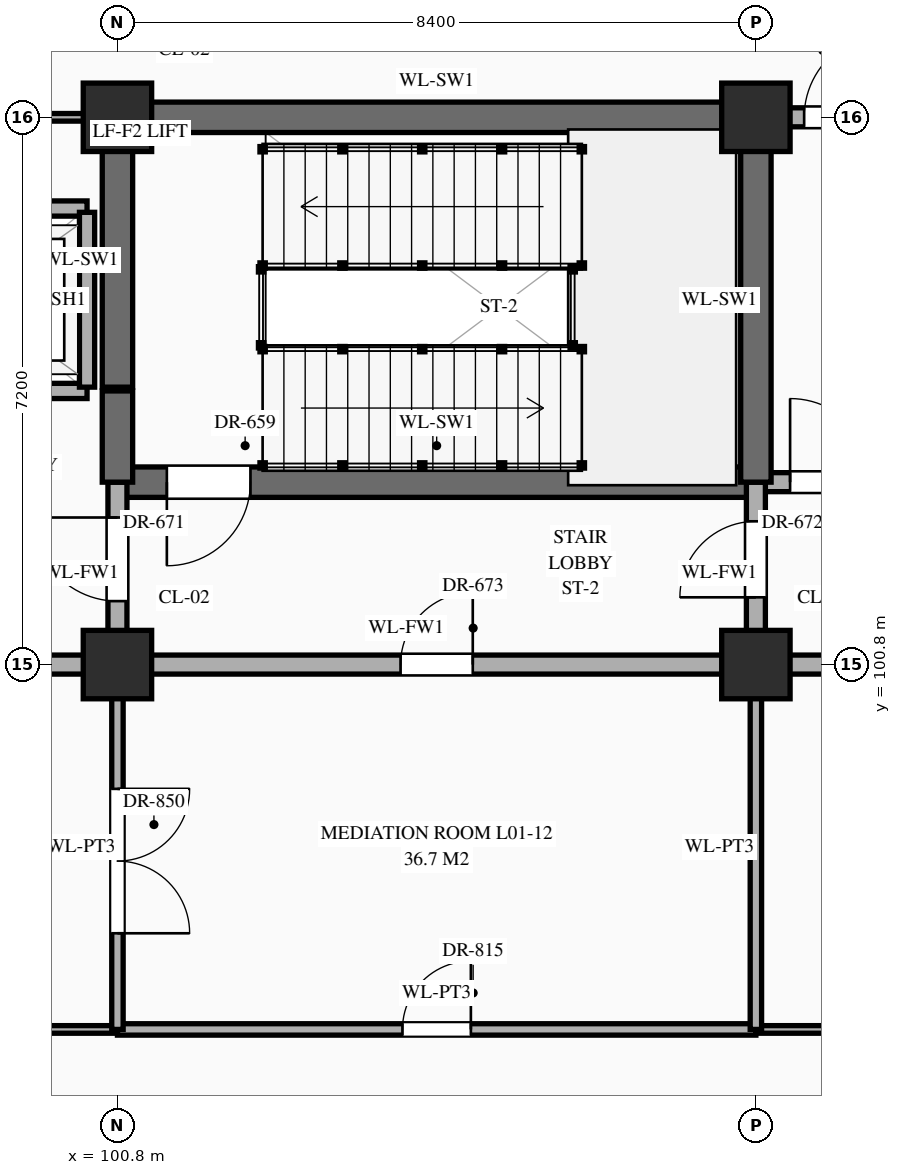
"""IFC4 building model, lengths in metres.
Left out: names, types, materials, properties, quantities, classifications, styles, units other than length and angle.
Written with IfcOpenShell. Run it as: python <this file> out.ifc"""

import sys

from ifc_helpers import new_model, si_unit, direction, frame, frame_2d, origin, origin_2d, place, context, subcontext, project, spatial, rectangle, extrude, element, fill, save


model = new_model("IFC4")
c1 = context("Model", 3, precision=1e-05, world=origin(), true_north=direction((0.0, 1.0)))
c2 = subcontext(c1, "Body", "Model", "MODEL_VIEW")
j1 = project(units=[si_unit("LENGTHUNIT", "METRE"), si_unit("PLANEANGLEUNIT", "RADIAN")], contexts=[c1])
p1 = place(None, origin())
s1 = spatial("IfcSite", under=j1, at=p1, CompositionType="ELEMENT")
p2 = place(p1, origin())
s2 = spatial("IfcBuilding", under=s1, at=p2, CompositionType="ELEMENT")
p3 = place(p2, origin())
s3 = spatial("IfcBuildingStorey", under=s2, at=p3, CompositionType="ELEMENT", Elevation=0.0)
for number, where, z_axis, x_axis in (
    (1, (100.8, 100.8, 0.0), (0.0, 0.0, 1.0), (1.0, 0.0, 0.0)),
    (2, (100.8, 108.0, 0.0), (0.0, 0.0, 1.0), (1.0, 0.0, 0.0)),
    (3, (109.2, 100.8, 0.0), (0.0, 0.0, 1.0), (1.0, 0.0, 0.0)),
    (4, (109.2, 108.0, 0.0), (0.0, 0.0, 1.0), (1.0, 0.0, 0.0)),
):
    element("IfcColumn", number, at=place(p3, frame(where, z_axis=z_axis, x_axis=x_axis)), inside=s3, PredefinedType="COLUMN", context=c2, shape_type="SweptSolid", body=[
        extrude(rectangle(XDim=0.9, YDim=0.9, at=origin_2d()), origin(), (0.0, 0.0, 1.0), 5.4),
    ])
p4 = place(p3, frame((67.2, 96.0, 0.0), z_axis=(0.0, 0.0, 1.0), x_axis=(1.0, 0.0, 0.0)))
e5 = element("IfcWall", 5, at=p4, inside=s3, PredefinedType="STANDARD", context=c2, shape_type="SweptSolid", body=[
    extrude(rectangle(XDim=33.6, YDim=0.1, at=frame_2d((16.8, 0.0))), origin(), (0.0, 0.0, 1.0), 5.12),
])
p5 = place(p4, frame((7.5, 0.0, 0.0)))
e6 = element("IfcOpeningElement", 6, at=p5, cuts=e5, PredefinedType="OPENING", context=c2, shape_type="SweptSolid", body=[
    extrude(rectangle(XDim=1.8, YDim=2.5, at=frame_2d((0.9, 1.25))), frame((0.0, 0.062, 0.0), z_axis=(0.0, -1.0, 0.0), x_axis=(1.0, 0.0, 0.0)), (0.0, 0.0, 1.0), 0.124),
])
p6 = place(p4, frame((24.25, 0.0, 0.0)))
e7 = element("IfcOpeningElement", 7, at=p6, cuts=e5, PredefinedType="OPENING", context=c2, shape_type="SweptSolid", body=[
    extrude(rectangle(XDim=1.9, YDim=2.5, at=frame_2d((0.95, 1.25))), frame((0.0, 0.062, 0.0), z_axis=(0.0, -1.0, 0.0), x_axis=(1.0, 0.0, 0.0)), (0.0, 0.0, 1.0), 0.124),
])
p7 = place(p3, frame((100.8, 96.0, 0.0), z_axis=(0.0, 0.0, 1.0), x_axis=(1.0, 0.0, 0.0)))
e8 = element("IfcWall", 8, at=p7, inside=s3, PredefinedType="STANDARD", context=c2, shape_type="SweptSolid", body=[
    extrude(rectangle(XDim=8.4, YDim=0.15, at=frame_2d((4.2, 0.0))), origin(), (0.0, 0.0, 1.0), 5.12),
])
p8 = place(p7, frame((3.75, 0.0, 0.0)))
e9 = element("IfcOpeningElement", 9, at=p8, cuts=e8, PredefinedType="OPENING", context=c2, shape_type="SweptSolid", body=[
    extrude(rectangle(XDim=0.9, YDim=2.15, at=frame_2d((0.45, 1.075))), frame((0.0, 0.087, 0.0), z_axis=(0.0, -1.0, 0.0), x_axis=(1.0, 0.0, 0.0)), (0.0, 0.0, 1.0), 0.174),
])
p9 = place(p3, frame((109.2, 96.0, 0.0), z_axis=(0.0, 0.0, 1.0), x_axis=(1.0, 0.0, 0.0)))
e10 = element("IfcWall", 10, at=p9, inside=s3, PredefinedType="STANDARD", context=c2, shape_type="SweptSolid", body=[
    extrude(rectangle(XDim=5.8, YDim=0.1, at=frame_2d((2.9, 0.0))), origin(), (0.0, 0.0, 1.0), 5.12),
])
p10 = place(p9, frame((1.27, 0.0, 0.0)))
e11 = element("IfcOpeningElement", 11, at=p10, cuts=e10, PredefinedType="OPENING", context=c2, shape_type="SweptSolid", body=[
    extrude(rectangle(XDim=0.86, YDim=2.1, at=frame_2d((0.43, 1.05))), frame((0.0, 0.062, 0.0), z_axis=(0.0, -1.0, 0.0), x_axis=(1.0, 0.0, 0.0)), (0.0, 0.0, 1.0), 0.124),
])
p11 = place(p9, frame((4.14, 0.0, 0.0)))
e12 = element("IfcOpeningElement", 12, at=p11, cuts=e10, PredefinedType="OPENING", context=c2, shape_type="SweptSolid", body=[
    extrude(rectangle(XDim=0.92, YDim=2.15, at=frame_2d((0.46, 1.075))), frame((0.0, 0.062, 0.0), z_axis=(0.0, -1.0, 0.0), x_axis=(1.0, 0.0, 0.0)), (0.0, 0.0, 1.0), 0.124),
])
p12 = place(p3, frame((96.6, 100.8, 0.0), z_axis=(0.0, 0.0, 1.0), x_axis=(1.0, 0.0, 0.0)))
e13 = element("IfcWall", 13, at=p12, inside=s3, PredefinedType="STANDARD", context=c2, shape_type="SweptSolid", body=[
    extrude(rectangle(XDim=16.0, YDim=0.25, at=frame_2d((8.0, 0.0))), origin(), (0.0, 0.0, 1.0), 4.27),
])
p13 = place(p12, frame((7.925, 0.0, 0.0)))
e14 = element("IfcOpeningElement", 14, at=p13, cuts=e13, PredefinedType="OPENING", context=c2, shape_type="SweptSolid", body=[
    extrude(rectangle(XDim=0.95, YDim=2.15, at=frame_2d((0.475, 1.075))), frame((0.0, 0.137, 0.0), z_axis=(0.0, -1.0, 0.0), x_axis=(1.0, 0.0, 0.0)), (0.0, 0.0, 1.0), 0.274),
])
p14 = place(p12, frame((0.915, 0.0, 0.0)))
e15 = element("IfcOpeningElement", 15, at=p14, cuts=e13, PredefinedType="OPENING", context=c2, shape_type="SweptSolid", body=[
    extrude(rectangle(XDim=2.0, YDim=2.4, at=frame_2d((1.0, 1.2))), frame((0.0, 0.137, 0.0), z_axis=(0.0, -1.0, 0.0), x_axis=(1.0, 0.0, 0.0)), (0.0, 0.0, 1.0), 0.274),
])
p15 = place(p3, frame((100.8, 103.2, 0.0), z_axis=(0.0, 0.0, 1.0), x_axis=(1.0, 0.0, 0.0)))
e16 = element("IfcWall", 16, at=p15, inside=s3, PredefinedType="SHEAR", context=c2, shape_type="SweptSolid", body=[
    extrude(rectangle(XDim=8.4, YDim=0.4, at=frame_2d((4.2, 0.0))), origin(), (0.0, 0.0, 1.0), 5.12),
])
p16 = place(p15, frame((0.65, 0.0, 0.0)))
e17 = element("IfcOpeningElement", 17, at=p16, cuts=e16, PredefinedType="OPENING", context=c2, shape_type="SweptSolid", body=[
    extrude(rectangle(XDim=1.1, YDim=2.2, at=frame_2d((0.55, 1.1))), frame((0.0, 0.212, 0.0), z_axis=(0.0, -1.0, 0.0), x_axis=(1.0, 0.0, 0.0)), (0.0, 0.0, 1.0), 0.424),
])
p17 = place(p3, frame((109.2, 103.2, 0.0), z_axis=(0.0, 0.0, 1.0), x_axis=(1.0, 0.0, 0.0)))
e18 = element("IfcWall", 18, at=p17, inside=s3, PredefinedType="STANDARD", context=c2, shape_type="SweptSolid", body=[
    extrude(rectangle(XDim=4.2, YDim=0.25, at=frame_2d((2.1, 0.0))), origin(), (0.0, 0.0, 1.0), 5.12),
])
p18 = place(p17, frame((0.45, 0.0, 0.0)))
e19 = element("IfcOpeningElement", 19, at=p18, cuts=e18, PredefinedType="OPENING", context=c2, shape_type="SweptSolid", body=[
    extrude(rectangle(XDim=1.1, YDim=2.2, at=frame_2d((0.55, 1.1))), frame((0.0, 0.137, 0.0), z_axis=(0.0, -1.0, 0.0), x_axis=(1.0, 0.0, 0.0)), (0.0, 0.0, 1.0), 0.274),
])
p19 = place(p17, frame((2.6, 0.0, 0.0)))
e20 = element("IfcOpeningElement", 20, at=p19, cuts=e18, PredefinedType="OPENING", context=c2, shape_type="SweptSolid", body=[
    extrude(rectangle(XDim=1.0, YDim=2.2, at=frame_2d((0.5, 1.1))), frame((0.0, 0.137, 0.0), z_axis=(0.0, -1.0, 0.0), x_axis=(1.0, 0.0, 0.0)), (0.0, 0.0, 1.0), 0.274),
])
p20 = place(p3, frame((97.4, 104.4, 0.0), z_axis=(0.0, 0.0, 1.0), x_axis=(1.0, 0.0, 0.0)))
e21 = element("IfcWall", 21, at=p20, inside=s3, PredefinedType="STANDARD", context=c2, shape_type="SweptSolid", body=[
    extrude(rectangle(XDim=3.0, YDim=0.2, at=frame_2d((1.5, 0.0))), origin(), (0.0, 0.0, 1.0), 5.12),
])
p21 = place(p20, frame((0.9, 0.0, 0.0)))
e22 = element("IfcOpeningElement", 22, at=p21, cuts=e21, PredefinedType="OPENING", context=c2, shape_type="SweptSolid", body=[
    extrude(rectangle(XDim=1.2, YDim=2.15, at=frame_2d((0.6, 1.075))), frame((0.0, 0.112, 0.0), z_axis=(0.0, -1.0, 0.0), x_axis=(1.0, 0.0, 0.0)), (0.0, 0.0, 1.0), 0.224),
])
p22 = place(p3, frame((97.4, 106.8, 0.0), z_axis=(0.0, 0.0, 1.0), x_axis=(1.0, 0.0, 0.0)))
e23 = element("IfcWall", 23, at=p22, inside=s3, PredefinedType="STANDARD", context=c2, shape_type="SweptSolid", body=[
    extrude(rectangle(XDim=3.0, YDim=0.2, at=frame_2d((1.5, 0.0))), origin(), (0.0, 0.0, 1.0), 5.12),
])
p23 = place(p3, frame((96.65, 108.0, 0.0), z_axis=(0.0, 0.0, 1.0), x_axis=(1.0, 0.0, 0.0)))
e24 = element("IfcWall", 24, at=p23, inside=s3, PredefinedType="STANDARD", context=c2, shape_type="SweptSolid", body=[
    extrude(rectangle(XDim=4.1, YDim=0.1, at=frame_2d((2.05, 0.0))), origin(), (0.0, 0.0, 1.0), 4.27),
])
p24 = place(p3, frame((100.8, 108.0, 0.0), z_axis=(0.0, 0.0, 1.0), x_axis=(1.0, 0.0, 0.0)))
e25 = element("IfcWall", 25, at=p24, inside=s3, PredefinedType="SHEAR", context=c2, shape_type="SweptSolid", body=[
    extrude(rectangle(XDim=8.4, YDim=0.4, at=frame_2d((4.2, 0.0))), origin(), (0.0, 0.0, 1.0), 5.12),
])
p25 = place(p3, frame((109.2, 108.0, 0.0), z_axis=(0.0, 0.0, 1.0), x_axis=(1.0, 0.0, 0.0)))
e26 = element("IfcWall", 26, at=p25, inside=s3, PredefinedType="STANDARD", context=c2, shape_type="SweptSolid", body=[
    extrude(rectangle(XDim=4.2, YDim=0.25, at=frame_2d((2.1, 0.0))), origin(), (0.0, 0.0, 1.0), 4.27),
])
p26 = place(p25, frame((0.635, 0.0, 0.0)))
e27 = element("IfcOpeningElement", 27, at=p26, cuts=e26, PredefinedType="OPENING", context=c2, shape_type="SweptSolid", body=[
    extrude(rectangle(XDim=1.1, YDim=2.2, at=frame_2d((0.55, 1.1))), frame((0.0, 0.137, 0.0), z_axis=(0.0, -1.0, 0.0), x_axis=(1.0, 0.0, 0.0)), (0.0, 0.0, 1.0), 0.274),
])
p27 = place(p25, frame((2.6, 0.0, 0.0)))
e28 = element("IfcOpeningElement", 28, at=p27, cuts=e26, PredefinedType="OPENING", context=c2, shape_type="SweptSolid", body=[
    extrude(rectangle(XDim=1.0, YDim=2.2, at=frame_2d((0.5, 1.1))), frame((0.0, 0.137, 0.0), z_axis=(0.0, -1.0, 0.0), x_axis=(1.0, 0.0, 0.0)), (0.0, 0.0, 1.0), 0.274),
])
p28 = place(p3, frame((100.4, 104.45, 0.0), z_axis=(0.0, 0.0, 1.0), x_axis=(0.0, 1.0, 0.0)))
e29 = element("IfcWall", 29, at=p28, inside=s3, PredefinedType="STANDARD", context=c2, shape_type="SweptSolid", body=[
    extrude(rectangle(XDim=2.3, YDim=0.2, at=frame_2d((1.15, 0.0))), origin(), (0.0, 0.0, 1.0), 5.12),
])
p29 = place(p3, frame((100.8, 96.0, 0.0), z_axis=(0.0, 0.0, 1.0), x_axis=(0.0, 1.0, 0.0)))
e30 = element("IfcWall", 30, at=p29, inside=s3, PredefinedType="STANDARD", context=c2, shape_type="SweptSolid", body=[
    extrude(rectangle(XDim=4.8, YDim=0.15, at=frame_2d((2.4, 0.0))), origin(), (0.0, 0.0, 1.0), 4.37),
])
p30 = place(p29, frame((1.265, 0.0, 0.0)))
e31 = element("IfcOpeningElement", 31, at=p30, cuts=e30, PredefinedType="OPENING", context=c2, shape_type="SweptSolid", body=[
    extrude(rectangle(XDim=1.9, YDim=2.5, at=frame_2d((0.95, 1.25))), frame((0.0, 0.087, 0.0), z_axis=(0.0, -1.0, 0.0), x_axis=(1.0, 0.0, 0.0)), (0.0, 0.0, 1.0), 0.174),
])
p31 = place(p3, frame((100.8, 100.8, 0.0), z_axis=(0.0, 0.0, 1.0), x_axis=(0.0, 1.0, 0.0)))
e32 = element("IfcWall", 32, at=p31, inside=s3, PredefinedType="STANDARD", context=c2, shape_type="SweptSolid", body=[
    extrude(rectangle(XDim=2.4, YDim=0.25, at=frame_2d((1.2, 0.0))), origin(), (0.0, 0.0, 1.0), 4.37),
])
p32 = place(p31, frame((0.835, 0.0, 0.0)))
e33 = element("IfcOpeningElement", 33, at=p32, cuts=e32, PredefinedType="OPENING", context=c2, shape_type="SweptSolid", body=[
    extrude(rectangle(XDim=1.1, YDim=2.2, at=frame_2d((0.55, 1.1))), frame((0.0, 0.137, 0.0), z_axis=(0.0, -1.0, 0.0), x_axis=(1.0, 0.0, 0.0)), (0.0, 0.0, 1.0), 0.274),
])
p33 = place(p3, frame((100.8, 103.2, 0.0), z_axis=(0.0, 0.0, 1.0), x_axis=(0.0, 1.0, 0.0)))
e34 = element("IfcWall", 34, at=p33, inside=s3, PredefinedType="SHEAR", context=c2, shape_type="SweptSolid", body=[
    extrude(rectangle(XDim=1.2, YDim=0.4, at=frame_2d((0.6, 0.0))), origin(), (0.0, 0.0, 1.0), 5.12),
])
p34 = place(p3, frame((100.8, 104.45, 0.0), z_axis=(0.0, 0.0, 1.0), x_axis=(0.0, 1.0, 0.0)))
e35 = element("IfcWall", 35, at=p34, inside=s3, PredefinedType="SHEAR", context=c2, shape_type="SweptSolid", body=[
    extrude(rectangle(XDim=3.5, YDim=0.4, at=frame_2d((1.75, 0.0))), origin(), (0.0, 0.0, 1.0), 5.12),
])
p35 = place(p3, frame((109.2, 96.0, 0.0), z_axis=(0.0, 0.0, 1.0), x_axis=(0.0, 1.0, 0.0)))
e36 = element("IfcWall", 36, at=p35, inside=s3, PredefinedType="STANDARD", context=c2, shape_type="SweptSolid", body=[
    extrude(rectangle(XDim=4.8, YDim=0.15, at=frame_2d((2.4, 0.0))), origin(), (0.0, 0.0, 1.0), 4.37),
])
p36 = place(p3, frame((109.2, 100.8, 0.0), z_axis=(0.0, 0.0, 1.0), x_axis=(0.0, 1.0, 0.0)))
e37 = element("IfcWall", 37, at=p36, inside=s3, PredefinedType="STANDARD", context=c2, shape_type="SweptSolid", body=[
    extrude(rectangle(XDim=2.4, YDim=0.25, at=frame_2d((1.2, 0.0))), origin(), (0.0, 0.0, 1.0), 4.37),
])
p37 = place(p36, frame((0.885, 0.0, 0.0)))
e38 = element("IfcOpeningElement", 38, at=p37, cuts=e37, PredefinedType="OPENING", context=c2, shape_type="SweptSolid", body=[
    extrude(rectangle(XDim=1.0, YDim=2.2, at=frame_2d((0.5, 1.1))), frame((0.0, 0.137, 0.0), z_axis=(0.0, -1.0, 0.0), x_axis=(1.0, 0.0, 0.0)), (0.0, 0.0, 1.0), 0.274),
])
p38 = place(p3, frame((109.2, 103.2, 0.0), z_axis=(0.0, 0.0, 1.0), x_axis=(0.0, 1.0, 0.0)))
e39 = element("IfcWall", 39, at=p38, inside=s3, PredefinedType="SHEAR", context=c2, shape_type="SweptSolid", body=[
    extrude(rectangle(XDim=4.8, YDim=0.4, at=frame_2d((2.4, 0.0))), origin(), (0.0, 0.0, 1.0), 5.12),
])
p39 = place(p16, frame((1.1, 0.0, 0.0), z_axis=(0.0, 0.0, 1.0), x_axis=(-1.0, 0.0, 0.0)))
e40 = element("IfcDoor", 40, at=p39, inside=s3, OperationType="SINGLE_SWING_RIGHT", PredefinedType="DOOR", context=c2, shape_type="SweptSolid", body=[
    extrude(rectangle(XDim=1.1, YDim=2.2, at=frame_2d((0.55, 1.1))), frame((0.0, 0.025, 0.0), z_axis=(0.0, -1.0, 0.0), x_axis=(1.0, 0.0, 0.0)), (0.0, 0.0, 1.0), 0.05),
])
fill(e17, e40)
p40 = place(p32, origin())
e41 = element("IfcDoor", 41, at=p40, inside=s3, OperationType="SINGLE_SWING_RIGHT", PredefinedType="DOOR", context=c2, shape_type="SweptSolid", body=[
    extrude(rectangle(XDim=1.1, YDim=2.2, at=frame_2d((0.55, 1.1))), frame((0.0, 0.025, 0.0), z_axis=(0.0, -1.0, 0.0), x_axis=(1.0, 0.0, 0.0)), (0.0, 0.0, 1.0), 0.05),
])
fill(e33, e41)
p41 = place(p37, origin())
e42 = element("IfcDoor", 42, at=p41, inside=s3, OperationType="SINGLE_SWING_LEFT", PredefinedType="DOOR", context=c2, shape_type="SweptSolid", body=[
    extrude(rectangle(XDim=1.0, YDim=2.2, at=frame_2d((0.5, 1.1))), frame((0.0, 0.025, 0.0), z_axis=(0.0, -1.0, 0.0), x_axis=(1.0, 0.0, 0.0)), (0.0, 0.0, 1.0), 0.05),
])
fill(e38, e42)
p42 = place(p13, origin())
e43 = element("IfcDoor", 43, at=p42, inside=s3, OperationType="SINGLE_SWING_RIGHT", PredefinedType="DOOR", context=c2, shape_type="SweptSolid", body=[
    extrude(rectangle(XDim=0.95, YDim=2.15, at=frame_2d((0.475, 1.075))), frame((0.0, 0.025, 0.0), z_axis=(0.0, -1.0, 0.0), x_axis=(1.0, 0.0, 0.0)), (0.0, 0.0, 1.0), 0.05),
])
fill(e14, e43)
p43 = place(p18, origin())
e44 = element("IfcDoor", 44, at=p43, inside=s3, OperationType="SINGLE_SWING_LEFT", PredefinedType="DOOR", context=c2, shape_type="SweptSolid", body=[
    extrude(rectangle(XDim=1.1, YDim=2.2, at=frame_2d((0.55, 1.1))), frame((0.0, 0.025, 0.0), z_axis=(0.0, -1.0, 0.0), x_axis=(1.0, 0.0, 0.0)), (0.0, 0.0, 1.0), 0.05),
])
fill(e19, e44)
p44 = place(p26, origin())
e45 = element("IfcDoor", 45, at=p44, inside=s3, OperationType="SINGLE_SWING_RIGHT", PredefinedType="DOOR", context=c2, shape_type="SweptSolid", body=[
    extrude(rectangle(XDim=1.1, YDim=2.2, at=frame_2d((0.55, 1.1))), frame((0.0, 0.025, 0.0), z_axis=(0.0, -1.0, 0.0), x_axis=(1.0, 0.0, 0.0)), (0.0, 0.0, 1.0), 0.05),
])
fill(e27, e45)
p45 = place(p8, origin())
e46 = element("IfcDoor", 46, at=p45, inside=s3, OperationType="SINGLE_SWING_RIGHT", PredefinedType="DOOR", context=c2, shape_type="SweptSolid", body=[
    extrude(rectangle(XDim=0.9, YDim=2.15, at=frame_2d((0.45, 1.075))), frame((0.0, 0.025, 0.0), z_axis=(0.0, -1.0, 0.0), x_axis=(1.0, 0.0, 0.0)), (0.0, 0.0, 1.0), 0.05),
])
fill(e9, e46)
p46 = place(p30, frame((1.9, 0.0, 0.0), z_axis=(0.0, 0.0, 1.0), x_axis=(-1.0, 0.0, 0.0)))
e47 = element("IfcDoor", 47, at=p46, inside=s3, OperationType="DOUBLE_DOOR_SINGLE_SWING", PredefinedType="DOOR", context=c2, shape_type="SweptSolid", body=[
    extrude(rectangle(XDim=1.9, YDim=2.5, at=frame_2d((0.95, 1.25))), frame((0.0, 0.025, 0.0), z_axis=(0.0, -1.0, 0.0), x_axis=(1.0, 0.0, 0.0)), (0.0, 0.0, 1.0), 0.05),
])
fill(e31, e47)
save(model, sys.argv[1])
